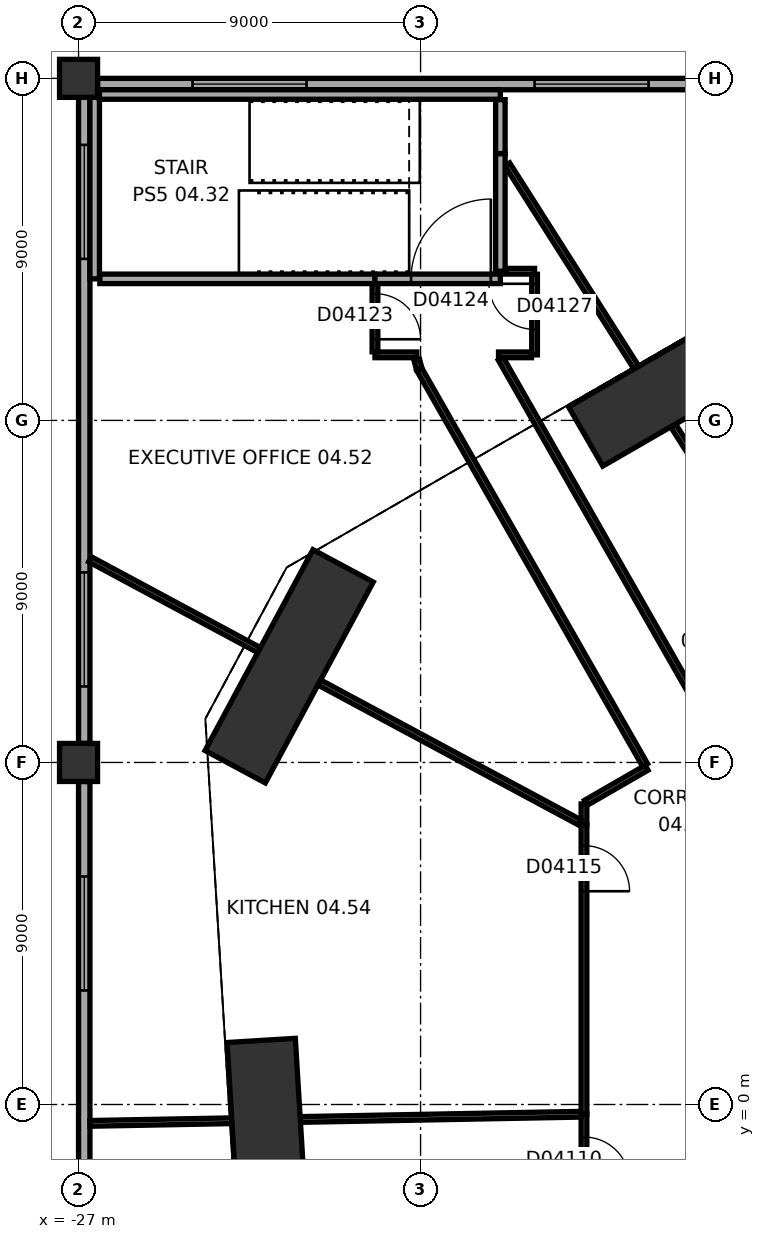
"""IFC4 building model, lengths in metres.
Left out: names, types, materials, properties, quantities, classifications, styles, units other than length and angle.
Written with IfcOpenShell. Run it as: python <this file> out.ifc"""

import sys

from ifc_helpers import new_model, si_unit, direction, frame, frame_2d, origin, origin_2d, place, context, subcontext, project, spatial, rectangle, extrude, element, fill, save


model = new_model("IFC4")
c1 = context("Model", 3, precision=1e-05, world=origin(), true_north=direction((0.0, 1.0)))
c2 = subcontext(c1, "Body", "Model", "MODEL_VIEW")
j1 = project(units=[si_unit("LENGTHUNIT", "METRE"), si_unit("PLANEANGLEUNIT", "RADIAN")], contexts=[c1])
p1 = place(None, origin())
s1 = spatial("IfcSite", under=j1, at=p1, CompositionType="ELEMENT")
p2 = place(p1, origin())
s2 = spatial("IfcBuilding", under=s1, at=p2, CompositionType="ELEMENT")
p3 = place(p2, frame((0.0, 0.0, 29.0)))
s3 = spatial("IfcBuildingStorey", under=s2, at=p3, CompositionType="ELEMENT", Elevation=29.0)
p4 = place(p3, frame((-11.837, 18.627, 0.0), z_axis=(0.0, 0.0, 1.0), x_axis=(-0.866028021766, -0.499995465495, 0.0)))
e1 = element("IfcColumn", 1, at=p4, inside=s3, PredefinedType="COLUMN", context=c2, shape_type="SweptSolid", body=[
    extrude(rectangle(XDim=4.2, YDim=1.8, at=origin_2d()), origin(), (0.0, 0.0, 1.0), 5.5),
])
p5 = place(p3, frame((-21.458, 11.53, 0.0), z_axis=(0.0, 0.0, 1.0), x_axis=(-0.473316592293, -0.880892390397, 0.0)))
e2 = element("IfcColumn", 2, at=p5, inside=s3, PredefinedType="COLUMN", context=c2, shape_type="SweptSolid", body=[
    extrude(rectangle(XDim=6.0, YDim=1.8, at=origin_2d()), origin(), (0.0, 0.0, 1.0), 5.5),
])
p6 = place(p3, frame((-22.066, -0.411, 0.0), z_axis=(0.0, 0.0, 1.0), x_axis=(0.061046797461, -0.99813490497, 0.0)))
e3 = element("IfcColumn", 3, at=p6, inside=s3, PredefinedType="COLUMN", context=c2, shape_type="SweptSolid", body=[
    extrude(rectangle(XDim=4.2, YDim=1.8, at=origin_2d()), origin(), (0.0, 0.0, 1.0), 5.5),
])
for number, where, z_axis, x_axis in (
    (4, (-27.0, 9.0, 0.0), (0.0, 0.0, 1.0), (1.0, 0.0, 0.0)),
    (5, (-27.0, 27.0, 0.0), (0.0, 0.0, 1.0), (1.0, 0.0, 0.0)),
):
    element("IfcColumn", number, at=place(p3, frame(where, z_axis=z_axis, x_axis=x_axis)), inside=s3, PredefinedType="COLUMN", context=c2, shape_type="SweptSolid", body=[
        extrude(rectangle(XDim=1.0, YDim=1.0, at=origin_2d()), origin(), (0.0, 0.0, 1.0), 5.5),
    ])
p7 = place(p3, frame((-9.5, 26.85, 0.0), z_axis=(0.0, 0.0, 1.0), x_axis=(-1.0, 0.0, 0.0)))
e6 = element("IfcWall", 6, at=p7, inside=s3, PredefinedType="STANDARD", context=c2, shape_type="SweptSolid", body=[
    extrude(rectangle(XDim=17.0, YDim=0.3, at=frame_2d((8.5, 0.0))), origin(), (0.0, 0.0, 1.0), 3.95),
])
p8 = place(p7, frame((2.5, 0.0, 1.0)))
e7 = element("IfcOpeningElement", 7, at=p8, cuts=e6, PredefinedType="OPENING", context=c2, shape_type="SweptSolid", body=[
    extrude(rectangle(XDim=3.0, YDim=2.6, at=frame_2d((1.5, 1.3))), frame((0.0, 0.16, 0.0), z_axis=(0.0, -1.0, 0.0), x_axis=(1.0, 0.0, 0.0)), (0.0, 0.0, 1.0), 0.32),
])
p9 = place(p7, frame((11.5, 0.0, 1.0)))
e8 = element("IfcOpeningElement", 8, at=p9, cuts=e6, PredefinedType="OPENING", context=c2, shape_type="SweptSolid", body=[
    extrude(rectangle(XDim=3.0, YDim=2.6, at=frame_2d((1.5, 1.3))), frame((0.0, 0.16, 0.0), z_axis=(0.0, -1.0, 0.0), x_axis=(1.0, 0.0, 0.0)), (0.0, 0.0, 1.0), 0.32),
])
p10 = place(p3, frame((-26.85, 26.5, 0.0), z_axis=(0.0, 0.0, 1.0), x_axis=(0.0, -1.0, 0.0)))
e9 = element("IfcWall", 9, at=p10, inside=s3, PredefinedType="STANDARD", context=c2, shape_type="SweptSolid", body=[
    extrude(rectangle(XDim=17.0, YDim=0.3, at=frame_2d((8.5, 0.0))), origin(), (0.0, 0.0, 1.0), 3.95),
])
p11 = place(p10, frame((1.25, 0.0, 1.0)))
e10 = element("IfcOpeningElement", 10, at=p11, cuts=e9, PredefinedType="OPENING", context=c2, shape_type="SweptSolid", body=[
    extrude(rectangle(XDim=3.0, YDim=2.6, at=frame_2d((1.5, 1.3))), frame((0.0, 0.16, 0.0), z_axis=(0.0, -1.0, 0.0), x_axis=(1.0, 0.0, 0.0)), (0.0, 0.0, 1.0), 0.32),
])
p12 = place(p10, frame((12.5, 0.0, 1.0)))
e11 = element("IfcOpeningElement", 11, at=p12, cuts=e9, PredefinedType="OPENING", context=c2, shape_type="SweptSolid", body=[
    extrude(rectangle(XDim=3.0, YDim=2.6, at=frame_2d((1.5, 1.3))), frame((0.0, 0.16, 0.0), z_axis=(0.0, -1.0, 0.0), x_axis=(1.0, 0.0, 0.0)), (0.0, 0.0, 1.0), 0.32),
])
p13 = place(p3, frame((-26.85, 8.5, 0.0), z_axis=(0.0, 0.0, 1.0), x_axis=(0.0, -1.0, 0.0)))
e12 = element("IfcWall", 12, at=p13, inside=s3, PredefinedType="STANDARD", context=c2, shape_type="SweptSolid", body=[
    extrude(rectangle(XDim=17.0, YDim=0.3, at=frame_2d((8.5, 0.0))), origin(), (0.0, 0.0, 1.0), 3.95),
])
p14 = place(p13, frame((2.5, 0.0, 1.0)))
e13 = element("IfcOpeningElement", 13, at=p14, cuts=e12, PredefinedType="OPENING", context=c2, shape_type="SweptSolid", body=[
    extrude(rectangle(XDim=3.0, YDim=2.6, at=frame_2d((1.5, 1.3))), frame((0.0, 0.16, 0.0), z_axis=(0.0, -1.0, 0.0), x_axis=(1.0, 0.0, 0.0)), (0.0, 0.0, 1.0), 0.32),
])
p15 = place(p13, frame((11.5, 0.0, 1.0)))
e14 = element("IfcOpeningElement", 14, at=p15, cuts=e12, PredefinedType="OPENING", context=c2, shape_type="SweptSolid", body=[
    extrude(rectangle(XDim=3.0, YDim=2.6, at=frame_2d((1.5, 1.3))), frame((0.0, 0.16, 0.0), z_axis=(0.0, -1.0, 0.0), x_axis=(1.0, 0.0, 0.0)), (0.0, 0.0, 1.0), 0.32),
])
p16 = place(p3, frame((-13.7, -7.909, 0.0), z_axis=(0.0, 0.0, 1.0), x_axis=(0.0, 1.0, 0.0)))
e15 = element("IfcWall", 15, at=p16, inside=s3, PredefinedType="PARTITIONING", context=c2, shape_type="SweptSolid", body=[
    extrude(rectangle(XDim=7.655, YDim=0.15, at=frame_2d((3.827, 0.0))), origin(), (0.0, 0.0, 1.0), 5.15),
])
p17 = place(p16, frame((5.854, 0.0, 0.0)))
e16 = element("IfcOpeningElement", 16, at=p17, cuts=e15, PredefinedType="OPENING", context=c2, shape_type="SweptSolid", body=[
    extrude(rectangle(XDim=1.2, YDim=2.1, at=frame_2d((0.6, 1.05))), frame((0.0, 0.085, 0.0), z_axis=(0.0, -1.0, 0.0), x_axis=(1.0, 0.0, 0.0)), (0.0, 0.0, 1.0), 0.17),
])
p18 = place(p3, frame((-22.967, -0.427, 0.0), z_axis=(0.0, 0.0, 1.0), x_axis=(-0.999826372694, -0.018633959993, 0.0)))
e17 = element("IfcWall", 17, at=p18, inside=s3, PredefinedType="PARTITIONING", context=c2, shape_type="SweptSolid", body=[
    extrude(rectangle(XDim=3.734, YDim=0.15, at=frame_2d((1.867, 0.0))), origin(), (0.0, 0.0, 1.0), 5.15),
])
p19 = place(p3, frame((-13.78, -0.257, 0.0), z_axis=(0.0, 0.0, 1.0), x_axis=(-0.999826849708, -0.018608347649, 0.0)))
e18 = element("IfcWall", 18, at=p19, inside=s3, PredefinedType="PARTITIONING", context=c2, shape_type="SweptSolid", body=[
    extrude(rectangle(XDim=7.386, YDim=0.15, at=frame_2d((3.693, 0.0))), origin(), (0.0, 0.0, 1.0), 5.15),
])
p20 = place(p3, frame((-13.7, -0.255, 0.0), z_axis=(0.0, 0.0, 1.0), x_axis=(0.0, 1.0, 0.0)))
e19 = element("IfcWall", 19, at=p20, inside=s3, PredefinedType="PARTITIONING", context=c2, shape_type="SweptSolid", body=[
    extrude(rectangle(XDim=7.616, YDim=0.15, at=frame_2d((3.808, 0.0))), origin(), (0.0, 0.0, 1.0), 5.15),
])
p21 = place(p20, frame((5.866, 0.0, 0.0)))
e20 = element("IfcOpeningElement", 20, at=p21, cuts=e19, PredefinedType="OPENING", context=c2, shape_type="SweptSolid", body=[
    extrude(rectangle(XDim=1.2, YDim=2.1, at=frame_2d((0.6, 1.05))), frame((0.0, 0.085, 0.0), z_axis=(0.0, -1.0, 0.0), x_axis=(1.0, 0.0, 0.0)), (0.0, 0.0, 1.0), 0.17),
])
p22 = place(p3, frame((-13.7, 7.362, 0.0), z_axis=(0.0, 0.0, 1.0), x_axis=(0.0, 1.0, 0.0)))
e21 = element("IfcWall", 21, at=p22, inside=s3, PredefinedType="PARTITIONING", context=c2, shape_type="SweptSolid", body=[
    extrude(rectangle(XDim=0.548, YDim=0.15, at=frame_2d((0.274, 0.0))), origin(), (0.0, 0.0, 1.0), 5.15),
])
p23 = place(p3, frame((-13.806, 7.418, 0.0), z_axis=(0.0, 0.0, 1.0), x_axis=(-0.880891557551, 0.473318142305, 0.0)))
e22 = element("IfcWall", 22, at=p23, inside=s3, PredefinedType="PARTITIONING", context=c2, shape_type="SweptSolid", body=[
    extrude(rectangle(XDim=7.787, YDim=0.15, at=frame_2d((3.894, 0.0))), origin(), (0.0, 0.0, 1.0), 5.15),
])
p24 = place(p3, frame((-13.648, 7.939, 0.0), z_axis=(0.0, 0.0, 1.0), x_axis=(0.866024486176, 0.500001589341, 0.0)))
e23 = element("IfcWall", 23, at=p24, inside=s3, PredefinedType="PARTITIONING", context=c2, shape_type="SweptSolid", body=[
    extrude(rectangle(XDim=1.842, YDim=0.15, at=frame_2d((0.921, 0.0))), origin(), (0.0, 0.0, 1.0), 5.15),
])
p25 = place(p3, frame((-12.092, 8.93, 0.0), z_axis=(0.0, 0.0, 1.0), x_axis=(-0.495564220718, 0.868571299977, 0.0)))
e24 = element("IfcWall", 24, at=p25, inside=s3, PredefinedType="PARTITIONING", context=c2, shape_type="SweptSolid", body=[
    extrude(rectangle(XDim=11.988, YDim=0.15, at=frame_2d((5.994, 0.0))), origin(), (0.0, 0.0, 1.0), 5.15),
])
p26 = place(p3, frame((-7.397, 11.641, 0.0), z_axis=(0.0, 0.0, 1.0), x_axis=(-0.536312130721, 0.844019726334, 0.0)))
e25 = element("IfcWall", 25, at=p26, inside=s3, PredefinedType="PARTITIONING", context=c2, shape_type="SweptSolid", body=[
    extrude(rectangle(XDim=7.376, YDim=0.15, at=frame_2d((3.688, 0.0))), origin(), (0.0, 0.0, 1.0), 5.15),
])
p27 = place(p3, frame((-22.251, 11.956, 0.0), z_axis=(0.0, 0.0, 1.0), x_axis=(-0.880902248523, 0.473298244817, 0.0)))
e26 = element("IfcWall", 26, at=p27, inside=s3, PredefinedType="PARTITIONING", context=c2, shape_type="SweptSolid", body=[
    extrude(rectangle(XDim=5.051, YDim=0.15, at=frame_2d((2.525, 0.0))), origin(), (0.0, 0.0, 1.0), 5.15),
])
p28 = place(p3, frame((-18.038, 19.362, 0.0), z_axis=(0.0, 0.0, 1.0), x_axis=(-0.257536433885, 0.966268588552, 0.0)))
e27 = element("IfcWall", 27, at=p28, inside=s3, PredefinedType="PARTITIONING", context=c2, shape_type="SweptSolid", body=[
    extrude(rectangle(XDim=0.241, YDim=0.15, at=frame_2d((0.12, 0.0))), origin(), (0.0, 0.0, 1.0), 5.15),
])
p29 = place(p3, frame((-12.32, 19.387, 0.0), z_axis=(0.0, 0.0, 1.0), x_axis=(-0.536309341483, 0.844021498682, 0.0)))
e28 = element("IfcWall", 28, at=p29, inside=s3, PredefinedType="PARTITIONING", context=c2, shape_type="SweptSolid", body=[
    extrude(rectangle(XDim=6.335, YDim=0.15, at=frame_2d((3.168, 0.0))), origin(), (0.0, 0.0, 1.0), 5.15),
])
p30 = place(p3, frame((-15.889, 19.621, 0.0), z_axis=(0.0, 0.0, 1.0), x_axis=(0.495540263005, -0.868584968636, 0.0)))
e29 = element("IfcWall", 29, at=p30, inside=s3, PredefinedType="PARTITIONING", context=c2, shape_type="SweptSolid", body=[
    extrude(rectangle(XDim=11.157, YDim=0.15, at=frame_2d((5.579, 0.0))), origin(), (0.0, 0.0, 1.0), 5.15),
])
p31 = place(p3, frame((-18.1, 19.725, 0.0), z_axis=(0.0, 0.0, 1.0), x_axis=(-1.0, 0.0, 0.0)))
e30 = element("IfcWall", 30, at=p31, inside=s3, PredefinedType="PARTITIONING", context=c2, shape_type="SweptSolid", body=[
    extrude(rectangle(XDim=1.1, YDim=0.15, at=frame_2d((0.55, 0.0))), origin(), (0.0, 0.0, 1.0), 5.15),
])
p32 = place(p3, frame((-15.08, 19.725, 0.0), z_axis=(0.0, 0.0, 1.0), x_axis=(-1.0, 0.0, 0.0)))
e31 = element("IfcWall", 31, at=p32, inside=s3, PredefinedType="PARTITIONING", context=c2, shape_type="SweptSolid", body=[
    extrude(rectangle(XDim=0.868, YDim=0.15, at=frame_2d((0.434, 0.0))), origin(), (0.0, 0.0, 1.0), 5.15),
])
p33 = place(p3, frame((-19.2, 19.805, 0.0), z_axis=(0.0, 0.0, 1.0), x_axis=(0.0, 1.0, 0.0)))
e32 = element("IfcWall", 32, at=p33, inside=s3, PredefinedType="PARTITIONING", context=c2, shape_type="SweptSolid", body=[
    extrude(rectangle(XDim=1.78, YDim=0.15, at=frame_2d((0.89, 0.0))), origin(), (0.0, 0.0, 1.0), 5.15),
])
p34 = place(p33, frame((0.33, 0.0, 0.0)))
e33 = element("IfcOpeningElement", 33, at=p34, cuts=e32, PredefinedType="OPENING", context=c2, shape_type="SweptSolid", body=[
    extrude(rectangle(XDim=1.2, YDim=2.1, at=frame_2d((0.6, 1.05))), frame((0.0, 0.085, 0.0), z_axis=(0.0, -1.0, 0.0), x_axis=(1.0, 0.0, 0.0)), (0.0, 0.0, 1.0), 0.17),
])
p35 = place(p3, frame((-19.2, 21.725, 0.0), z_axis=(0.0, 0.0, 1.0), x_axis=(-1.0, 0.0, 0.0)))
e34 = element("IfcWall", 34, at=p35, inside=s3, PredefinedType="SOLIDWALL", context=c2, shape_type="SweptSolid", body=[
    extrude(rectangle(XDim=7.24, YDim=0.25, at=frame_2d((3.62, 0.0))), origin(), (0.0, 0.0, 1.0), 5.15),
])
p36 = place(p3, frame((-15.9, 21.725, 0.0), z_axis=(0.0, 0.0, 1.0), x_axis=(-1.0, 0.0, 0.0)))
e35 = element("IfcWall", 35, at=p36, inside=s3, PredefinedType="SOLIDWALL", context=c2, shape_type="SweptSolid", body=[
    extrude(rectangle(XDim=3.3, YDim=0.25, at=frame_2d((1.65, 0.0))), origin(), (0.0, 0.0, 1.0), 5.15),
])
p37 = place(p36, frame((0.25, 0.0, 0.0)))
e36 = element("IfcOpeningElement", 36, at=p37, cuts=e35, PredefinedType="OPENING", context=c2, shape_type="SweptSolid", body=[
    extrude(rectangle(XDim=2.1, YDim=2.4, at=frame_2d((1.05, 1.2))), frame((0.0, 0.135, 0.0), z_axis=(0.0, -1.0, 0.0), x_axis=(1.0, 0.0, 0.0)), (0.0, 0.0, 1.0), 0.27),
])
p38 = place(p3, frame((-15.0, 21.845, 0.0), z_axis=(0.0, 0.0, 1.0), x_axis=(0.0, -1.0, 0.0)))
e37 = element("IfcWall", 37, at=p38, inside=s3, PredefinedType="PARTITIONING", context=c2, shape_type="SweptSolid", body=[
    extrude(rectangle(XDim=2.12, YDim=0.15, at=frame_2d((1.06, 0.0))), origin(), (0.0, 0.0, 1.0), 5.15),
])
p39 = place(p38, frame((0.25, 0.0, 0.0)))
e38 = element("IfcOpeningElement", 38, at=p39, cuts=e37, PredefinedType="OPENING", context=c2, shape_type="SweptSolid", body=[
    extrude(rectangle(XDim=1.2, YDim=2.1, at=frame_2d((0.6, 1.05))), frame((0.0, 0.085, 0.0), z_axis=(0.0, -1.0, 0.0), x_axis=(1.0, 0.0, 0.0)), (0.0, 0.0, 1.0), 0.17),
])
p40 = place(p3, frame((-15.76, 21.925, 0.0), z_axis=(0.0, 0.0, 1.0), x_axis=(1.0, 0.0, 0.0)))
e39 = element("IfcWall", 39, at=p40, inside=s3, PredefinedType="PARTITIONING", context=c2, shape_type="SweptSolid", body=[
    extrude(rectangle(XDim=0.76, YDim=0.15, at=frame_2d((0.38, 0.0))), origin(), (0.0, 0.0, 1.0), 5.15),
])
p41 = place(p3, frame((-15.9, 25.021, 0.0), z_axis=(0.0, 0.0, 1.0), x_axis=(0.0, -1.0, 0.0)))
e40 = element("IfcWall", 40, at=p41, inside=s3, PredefinedType="SOLIDWALL", context=c2, shape_type="SweptSolid", body=[
    extrude(rectangle(XDim=3.096, YDim=0.25, at=frame_2d((1.548, 0.0))), origin(), (0.0, 0.0, 1.0), 5.15),
])
p42 = place(p3, frame((-15.9, 26.44, 0.0), z_axis=(0.0, 0.0, 1.0), x_axis=(0.0, -1.0, 0.0)))
e41 = element("IfcWall", 41, at=p42, inside=s3, PredefinedType="SOLIDWALL", context=c2, shape_type="SweptSolid", body=[
    extrude(rectangle(XDim=1.418, YDim=0.25, at=frame_2d((0.709, 0.0))), origin(), (0.0, 0.0, 1.0), 5.15),
])
p43 = place(p3, frame((-26.575, 21.725, 0.0), z_axis=(0.0, 0.0, 1.0), x_axis=(0.0, 1.0, 0.0)))
e42 = element("IfcWall", 42, at=p43, inside=s3, PredefinedType="SOLIDWALL", context=c2, shape_type="SweptSolid", body=[
    extrude(rectangle(XDim=4.975, YDim=0.25, at=frame_2d((2.487, 0.0))), origin(), (0.0, 0.0, 1.0), 5.15),
])
p44 = place(p3, frame((-26.45, 26.575, 0.0), z_axis=(0.0, 0.0, 1.0), x_axis=(1.0, 0.0, 0.0)))
e43 = element("IfcWall", 43, at=p44, inside=s3, PredefinedType="SOLIDWALL", context=c2, shape_type="SweptSolid", body=[
    extrude(rectangle(XDim=10.55, YDim=0.25, at=frame_2d((5.275, 0.0))), origin(), (0.0, 0.0, 1.0), 5.15),
])
p45 = place(p8, origin())
e44 = element("IfcWindow", 44, at=p45, inside=s3, PartitioningType="SINGLE_PANEL", PredefinedType="WINDOW", context=c2, shape_type="SweptSolid", body=[
    extrude(rectangle(XDim=3.0, YDim=2.6, at=frame_2d((1.5, 1.3))), frame((0.0, 0.03, 0.0), z_axis=(0.0, -1.0, 0.0), x_axis=(1.0, 0.0, 0.0)), (0.0, 0.0, 1.0), 0.06),
])
fill(e7, e44)
p46 = place(p9, origin())
e45 = element("IfcWindow", 45, at=p46, inside=s3, PartitioningType="SINGLE_PANEL", PredefinedType="WINDOW", context=c2, shape_type="SweptSolid", body=[
    extrude(rectangle(XDim=3.0, YDim=2.6, at=frame_2d((1.5, 1.3))), frame((0.0, 0.03, 0.0), z_axis=(0.0, -1.0, 0.0), x_axis=(1.0, 0.0, 0.0)), (0.0, 0.0, 1.0), 0.06),
])
fill(e8, e45)
p47 = place(p11, origin())
e46 = element("IfcWindow", 46, at=p47, inside=s3, PartitioningType="SINGLE_PANEL", PredefinedType="WINDOW", context=c2, shape_type="SweptSolid", body=[
    extrude(rectangle(XDim=3.0, YDim=2.6, at=frame_2d((1.5, 1.3))), frame((0.0, 0.03, 0.0), z_axis=(0.0, -1.0, 0.0), x_axis=(1.0, 0.0, 0.0)), (0.0, 0.0, 1.0), 0.06),
])
fill(e10, e46)
p48 = place(p12, origin())
e47 = element("IfcWindow", 47, at=p48, inside=s3, PartitioningType="SINGLE_PANEL", PredefinedType="WINDOW", context=c2, shape_type="SweptSolid", body=[
    extrude(rectangle(XDim=3.0, YDim=2.6, at=frame_2d((1.5, 1.3))), frame((0.0, 0.03, 0.0), z_axis=(0.0, -1.0, 0.0), x_axis=(1.0, 0.0, 0.0)), (0.0, 0.0, 1.0), 0.06),
])
fill(e11, e47)
p49 = place(p14, origin())
e48 = element("IfcWindow", 48, at=p49, inside=s3, PartitioningType="SINGLE_PANEL", PredefinedType="WINDOW", context=c2, shape_type="SweptSolid", body=[
    extrude(rectangle(XDim=3.0, YDim=2.6, at=frame_2d((1.5, 1.3))), frame((0.0, 0.03, 0.0), z_axis=(0.0, -1.0, 0.0), x_axis=(1.0, 0.0, 0.0)), (0.0, 0.0, 1.0), 0.06),
])
fill(e13, e48)
p50 = place(p17, origin())
e49 = element("IfcDoor", 49, at=p50, inside=s3, OperationType="SINGLE_SWING_LEFT", PredefinedType="DOOR", context=c2, shape_type="SweptSolid", body=[
    extrude(rectangle(XDim=1.2, YDim=2.1, at=frame_2d((0.6, 1.05))), frame((0.0, 0.025, 0.0), z_axis=(0.0, -1.0, 0.0), x_axis=(1.0, 0.0, 0.0)), (0.0, 0.0, 1.0), 0.05),
])
fill(e16, e49)
p51 = place(p21, origin())
e50 = element("IfcDoor", 50, at=p51, inside=s3, OperationType="SINGLE_SWING_LEFT", PredefinedType="DOOR", context=c2, shape_type="SweptSolid", body=[
    extrude(rectangle(XDim=1.2, YDim=2.1, at=frame_2d((0.6, 1.05))), frame((0.0, 0.025, 0.0), z_axis=(0.0, -1.0, 0.0), x_axis=(1.0, 0.0, 0.0)), (0.0, 0.0, 1.0), 0.05),
])
fill(e20, e50)
p52 = place(p34, origin())
e51 = element("IfcDoor", 51, at=p52, inside=s3, OperationType="SINGLE_SWING_LEFT", PredefinedType="DOOR", context=c2, shape_type="SweptSolid", body=[
    extrude(rectangle(XDim=1.2, YDim=2.1, at=frame_2d((0.6, 1.05))), frame((0.0, 0.025, 0.0), z_axis=(0.0, -1.0, 0.0), x_axis=(1.0, 0.0, 0.0)), (0.0, 0.0, 1.0), 0.05),
])
fill(e33, e51)
p53 = place(p37, frame((2.1, 0.0, 0.0), z_axis=(0.0, 0.0, 1.0), x_axis=(-1.0, 0.0, 0.0)))
e52 = element("IfcDoor", 52, at=p53, inside=s3, OperationType="DOUBLE_DOOR_SINGLE_SWING", PredefinedType="DOOR", context=c2, shape_type="SweptSolid", body=[
    extrude(rectangle(XDim=2.1, YDim=2.4, at=frame_2d((1.05, 1.2))), frame((0.0, 0.025, 0.0), z_axis=(0.0, -1.0, 0.0), x_axis=(1.0, 0.0, 0.0)), (0.0, 0.0, 1.0), 0.05),
])
fill(e36, e52)
p54 = place(p39, origin())
e53 = element("IfcDoor", 53, at=p54, inside=s3, OperationType="SINGLE_SWING_LEFT", PredefinedType="DOOR", context=c2, shape_type="SweptSolid", body=[
    extrude(rectangle(XDim=1.2, YDim=2.1, at=frame_2d((0.6, 1.05))), frame((0.0, 0.025, 0.0), z_axis=(0.0, -1.0, 0.0), x_axis=(1.0, 0.0, 0.0)), (0.0, 0.0, 1.0), 0.05),
])
fill(e38, e53)
save(model, sys.argv[1])
